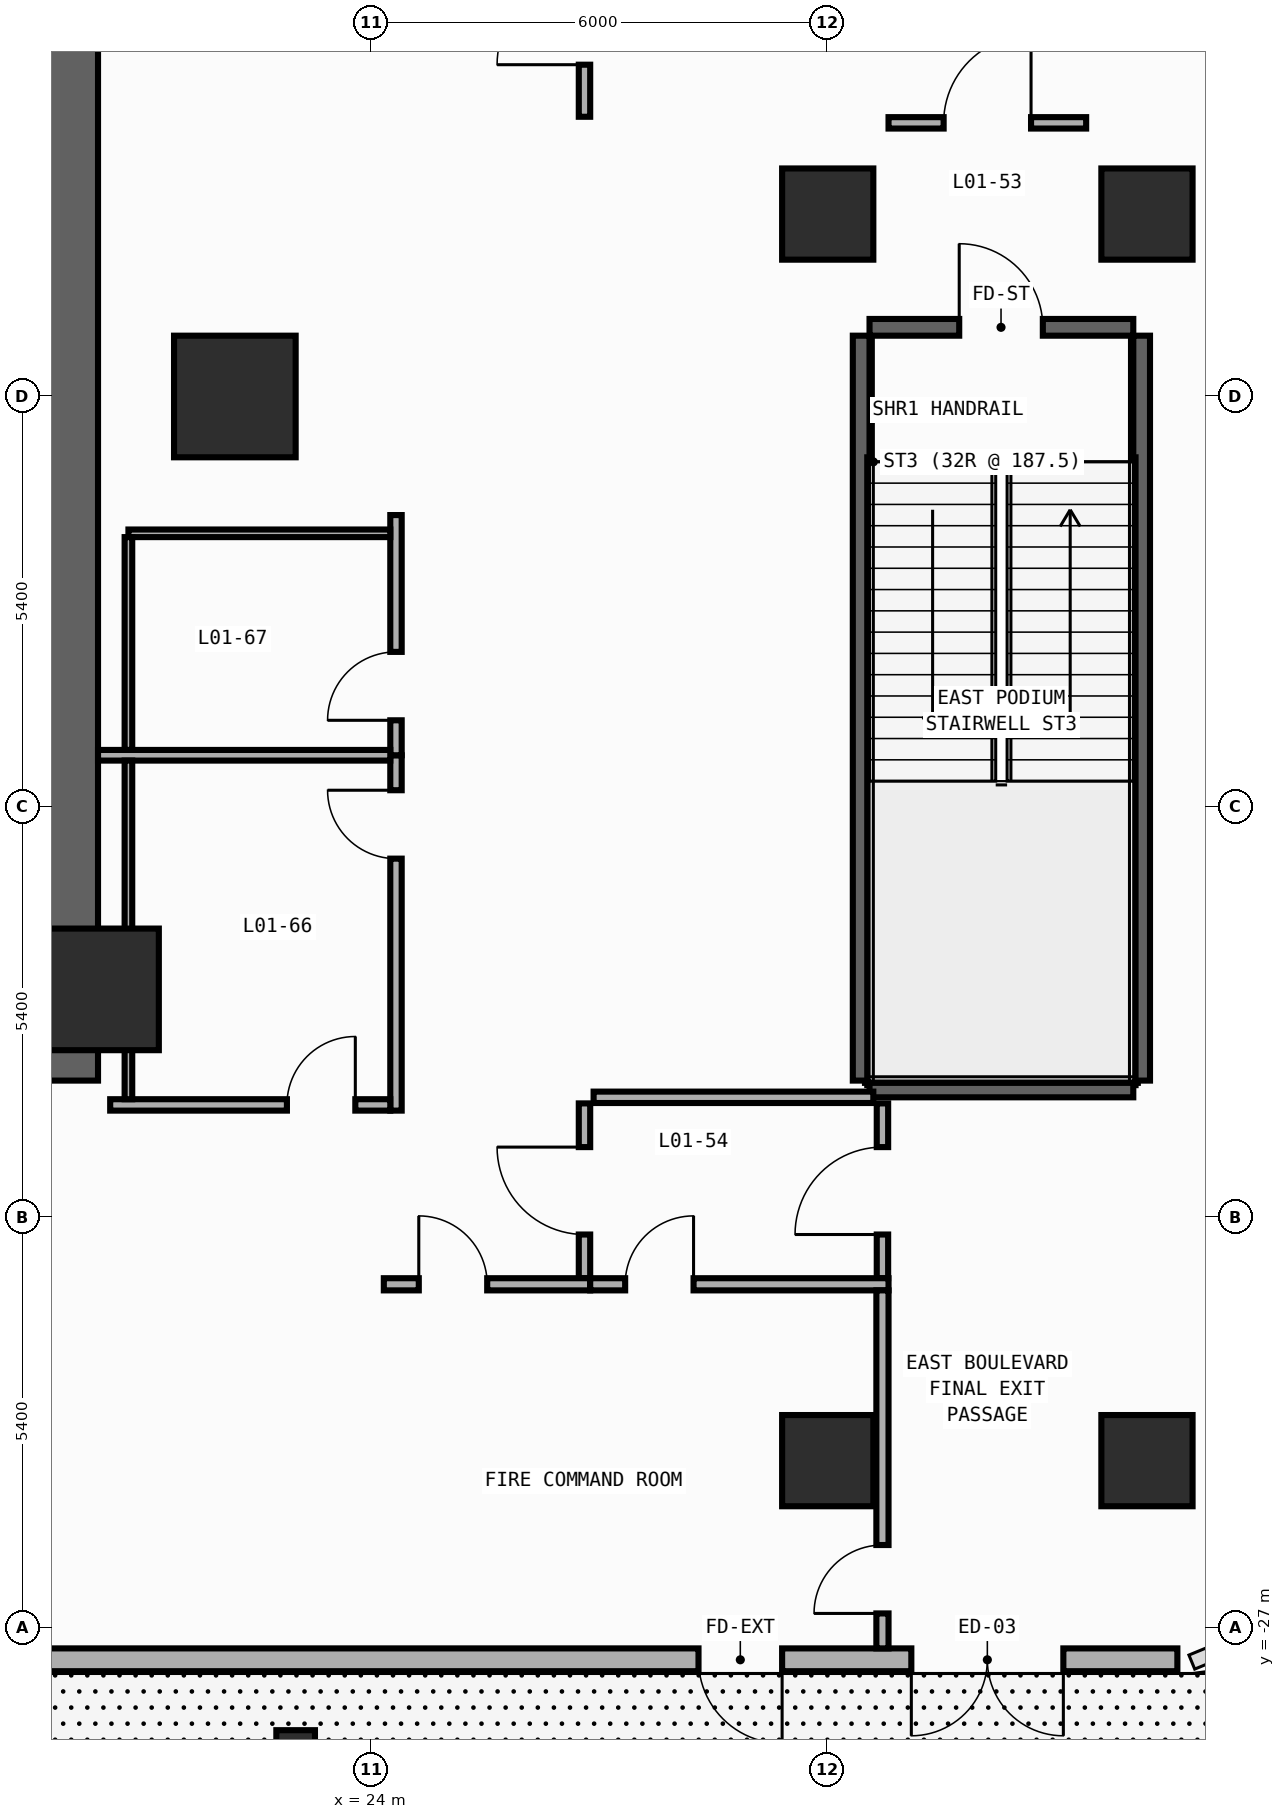
"""IFC4 building model, lengths in metres.
Left out: names, types, materials, properties, quantities, classifications, styles, units other than length and angle.
Written with IfcOpenShell. Run it as: python <this file> out.ifc"""

import sys

from ifc_helpers import new_model, si_unit, direction, frame, frame_2d, origin, origin_2d, place, context, subcontext, project, spatial, rectangle, hollow_circle, extrude, element, fill, save


model = new_model("IFC4")
c1 = context("Model", 3, precision=1e-05, world=origin(), true_north=direction((0.0, 1.0)))
c2 = subcontext(c1, "Body", "Model", "MODEL_VIEW")
j1 = project(units=[si_unit("LENGTHUNIT", "METRE"), si_unit("PLANEANGLEUNIT", "RADIAN")], contexts=[c1])
p1 = place(None, origin())
s1 = spatial("IfcSite", under=j1, at=p1, CompositionType="ELEMENT")
p2 = place(p1, origin())
s2 = spatial("IfcBuilding", under=s1, at=p2, CompositionType="ELEMENT")
p3 = place(p2, origin())
s3 = spatial("IfcBuildingStorey", under=s2, at=p3, CompositionType="ELEMENT", Elevation=0.0)
p4 = place(p3, frame((23.0, -28.6, -0.2), z_axis=(0.0, 0.0, 1.0), x_axis=(1.0, 0.0, 0.0)))
e1 = element("IfcColumn", 1, at=p4, inside=s3, PredefinedType="COLUMN", context=c2, shape_type="SweptSolid", body=[
    extrude(hollow_circle(Radius=0.254, WallThickness=0.025, at=origin_2d()), origin(), (0.0, 0.0, 1.0), 5.6),
])
p5 = place(p3, frame((20.0, -19.8, 0.0), z_axis=(0.0, 0.0, 1.0), x_axis=(0.0, 1.0, 0.0)))
e2 = element("IfcWall", 2, at=p5, inside=s3, PredefinedType="SHEAR", context=c2, shape_type="SweptSolid", body=[
    extrude(rectangle(XDim=27.0, YDim=0.8, at=frame_2d((13.5, 0.0))), origin(), (0.0, 0.0, 1.0), 5.7),
])
p6 = place(p3, frame((30.55, -9.89, 0.0), z_axis=(0.0, 0.0, 1.0), x_axis=(1.0, 0.0, 0.0)))
e3 = element("IfcWall", 3, at=p6, inside=s3, PredefinedType="SHEAR", context=c2, shape_type="SweptSolid", body=[
    extrude(rectangle(XDim=3.47, YDim=0.22, at=frame_2d((1.735, 0.0))), origin(), (0.0, 0.0, 1.0), 5.7),
])
p7 = place(p6, frame((1.18, 0.0, 0.0)))
e4 = element("IfcOpeningElement", 4, at=p7, cuts=e3, PredefinedType="OPENING", context=c2, shape_type="SweptSolid", body=[
    extrude(rectangle(XDim=1.1, YDim=2.2, at=frame_2d((0.55, 1.1))), frame((0.0, 0.12, 0.0), z_axis=(0.0, -1.0, 0.0), x_axis=(1.0, 0.0, 0.0)), (0.0, 0.0, 1.0), 0.24),
])
p8 = place(p3, frame((30.55, -19.91, 0.0), z_axis=(0.0, 0.0, 1.0), x_axis=(1.0, 0.0, 0.0)))
e5 = element("IfcWall", 5, at=p8, inside=s3, PredefinedType="SHEAR", context=c2, shape_type="SweptSolid", body=[
    extrude(rectangle(XDim=3.47, YDim=0.22, at=frame_2d((1.735, 0.0))), origin(), (0.0, 0.0, 1.0), 5.7),
])
for number, where, z_axis, x_axis in (
    (6, (30.44, -19.8, 0.0), (0.0, 0.0, 1.0), (0.0, 1.0, 0.0)),
    (7, (34.13, -19.8, 0.0), (0.0, 0.0, 1.0), (0.0, 1.0, 0.0)),
):
    element("IfcWall", number, at=place(p3, frame(where, z_axis=z_axis, x_axis=x_axis)), inside=s3, PredefinedType="SHEAR", context=c2, shape_type="SweptSolid", body=[
        extrude(rectangle(XDim=9.8, YDim=0.22, at=frame_2d((4.9, 0.0))), origin(), (0.0, 0.0, 1.0), 5.7),
    ])
p9 = place(p3, frame((20.4, -18.6, 0.0), z_axis=(0.0, 0.0, 1.0), x_axis=(1.0, 0.0, 0.0)))
e8 = element("IfcColumn", 8, at=p9, inside=s3, PredefinedType="COLUMN", context=c2, shape_type="SweptSolid", body=[
    extrude(rectangle(XDim=1.6, YDim=1.6, at=origin_2d()), origin(), (0.0, 0.0, 1.0), 6.0),
])
for number, where, z_axis, x_axis in (
    (9, (30.0, -24.8, 0.0), (0.0, 0.0, 1.0), (1.0, 0.0, 0.0)),
    (10, (30.0, -8.4, 0.0), (0.0, 0.0, 1.0), (1.0, 0.0, 0.0)),
    (11, (34.2, -24.8, 0.0), (0.0, 0.0, 1.0), (1.0, 0.0, 0.0)),
    (12, (34.2, -8.4, 0.0), (0.0, 0.0, 1.0), (1.0, 0.0, 0.0)),
):
    element("IfcColumn", number, at=place(p3, frame(where, z_axis=z_axis, x_axis=x_axis)), inside=s3, PredefinedType="COLUMN", context=c2, shape_type="SweptSolid", body=[
        extrude(rectangle(XDim=1.2, YDim=1.2, at=origin_2d()), origin(), (0.0, 0.0, 1.0), 6.0),
    ])
p10 = place(p3, frame((22.2, -10.8, 0.0), z_axis=(0.0, 0.0, 1.0), x_axis=(1.0, 0.0, 0.0)))
e13 = element("IfcColumn", 13, at=p10, inside=s3, PredefinedType="COLUMN", context=c2, shape_type="SweptSolid", body=[
    extrude(rectangle(XDim=1.6, YDim=1.6, at=origin_2d()), origin(), (0.0, 0.0, 1.0), 6.0),
])
p11 = place(p3, frame((34.6, -27.42, 0.0), z_axis=(0.0, 0.0, 1.0), x_axis=(-1.0, 0.0, 0.0)))
e14 = element("IfcWall", 14, at=p11, inside=s3, PredefinedType="STANDARD", context=c2, shape_type="SweptSolid", body=[
    extrude(rectangle(XDim=26.4, YDim=0.3, at=frame_2d((13.2, 0.0))), origin(), (0.0, 0.0, 1.0), 5.7),
])
p12 = place(p11, frame((1.5, 0.0, 0.0)))
e15 = element("IfcOpeningElement", 15, at=p12, cuts=e14, PredefinedType="OPENING", context=c2, shape_type="SweptSolid", body=[
    extrude(rectangle(XDim=2.0, YDim=2.4, at=frame_2d((1.0, 1.2))), frame((0.0, 0.16, 0.0), z_axis=(0.0, -1.0, 0.0), x_axis=(1.0, 0.0, 0.0)), (0.0, 0.0, 1.0), 0.32),
])
p13 = place(p11, frame((5.2, 0.0, 0.0)))
e16 = element("IfcOpeningElement", 16, at=p13, cuts=e14, PredefinedType="OPENING", context=c2, shape_type="SweptSolid", body=[
    extrude(rectangle(XDim=1.1, YDim=2.2, at=frame_2d((0.55, 1.1))), frame((0.0, 0.16, 0.0), z_axis=(0.0, -1.0, 0.0), x_axis=(1.0, 0.0, 0.0)), (0.0, 0.0, 1.0), 0.32),
])
p14 = place(p3, frame((30.8, -7.2, 0.0), z_axis=(0.0, 0.0, 1.0), x_axis=(1.0, 0.0, 0.0)))
e17 = element("IfcWall", 17, at=p14, inside=s3, PredefinedType="PARTITIONING", context=c2, shape_type="SweptSolid", body=[
    extrude(rectangle(XDim=2.6, YDim=0.15, at=frame_2d((1.3, 0.0))), origin(), (0.0, 0.0, 1.0), 5.7),
])
p15 = place(p14, frame((0.725, 0.0, 0.0)))
e18 = element("IfcOpeningElement", 18, at=p15, cuts=e17, PredefinedType="OPENING", context=c2, shape_type="SweptSolid", body=[
    extrude(rectangle(XDim=1.15, YDim=2.2, at=frame_2d((0.575, 1.1))), frame((0.0, 0.085, 0.0), z_axis=(0.0, -1.0, 0.0), x_axis=(1.0, 0.0, 0.0)), (0.0, 0.0, 1.0), 0.17),
])
p16 = place(p3, frame((26.8, -7.12, 0.0), z_axis=(0.0, 0.0, 1.0), x_axis=(0.0, 1.0, 0.0)))
e19 = element("IfcWall", 19, at=p16, inside=s3, PredefinedType="PARTITIONING", context=c2, shape_type="SweptSolid", body=[
    extrude(rectangle(XDim=2.52, YDim=0.15, at=frame_2d((1.26, 0.0))), origin(), (0.0, 0.0, 1.0), 5.7),
])
p17 = place(p16, frame((0.685, 0.0, 0.0)))
e20 = element("IfcOpeningElement", 20, at=p17, cuts=e19, PredefinedType="OPENING", context=c2, shape_type="SweptSolid", body=[
    extrude(rectangle(XDim=1.15, YDim=2.2, at=frame_2d((0.575, 1.1))), frame((0.0, 0.085, 0.0), z_axis=(0.0, -1.0, 0.0), x_axis=(1.0, 0.0, 0.0)), (0.0, 0.0, 1.0), 0.17),
])
p18 = place(p3, frame((26.8, -22.4, 0.0), z_axis=(0.0, 0.0, 1.0), x_axis=(0.0, 1.0, 0.0)))
e21 = element("IfcWall", 21, at=p18, inside=s3, PredefinedType="PARTITIONING", context=c2, shape_type="SweptSolid", body=[
    extrude(rectangle(XDim=2.3, YDim=0.15, at=frame_2d((1.15, 0.0))), origin(), (0.0, 0.0, 1.0), 5.7),
])
p19 = place(p18, frame((0.575, 0.0, 0.0)))
e22 = element("IfcOpeningElement", 22, at=p19, cuts=e21, PredefinedType="OPENING", context=c2, shape_type="SweptSolid", body=[
    extrude(rectangle(XDim=1.15, YDim=2.2, at=frame_2d((0.575, 1.1))), frame((0.0, 0.085, 0.0), z_axis=(0.0, -1.0, 0.0), x_axis=(1.0, 0.0, 0.0)), (0.0, 0.0, 1.0), 0.17),
])
p20 = place(p3, frame((30.72, -22.4, 0.0), z_axis=(0.0, 0.0, 1.0), x_axis=(0.0, 1.0, 0.0)))
e23 = element("IfcWall", 23, at=p20, inside=s3, PredefinedType="PARTITIONING", context=c2, shape_type="SweptSolid", body=[
    extrude(rectangle(XDim=2.3, YDim=0.15, at=frame_2d((1.15, 0.0))), origin(), (0.0, 0.0, 1.0), 5.7),
])
p21 = place(p20, frame((0.575, 0.0, 0.0)))
e24 = element("IfcOpeningElement", 24, at=p21, cuts=e23, PredefinedType="OPENING", context=c2, shape_type="SweptSolid", body=[
    extrude(rectangle(XDim=1.15, YDim=2.2, at=frame_2d((0.575, 1.1))), frame((0.0, 0.085, 0.0), z_axis=(0.0, -1.0, 0.0), x_axis=(1.0, 0.0, 0.0)), (0.0, 0.0, 1.0), 0.17),
])
p22 = place(p3, frame((26.92, -20.02, 0.0), z_axis=(0.0, 0.0, 1.0), x_axis=(1.0, 0.0, 0.0)))
e25 = element("IfcWall", 25, at=p22, inside=s3, PredefinedType="PARTITIONING", context=c2, shape_type="SweptSolid", body=[
    extrude(rectangle(XDim=3.68, YDim=0.15, at=frame_2d((1.84, 0.0))), origin(), (0.0, 0.0, 1.0), 5.7),
])
p23 = place(p3, frame((24.16, -22.48, 0.0), z_axis=(0.0, 0.0, 1.0), x_axis=(1.0, 0.0, 0.0)))
e26 = element("IfcWall", 26, at=p23, inside=s3, PredefinedType="PARTITIONING", context=c2, shape_type="SweptSolid", body=[
    extrude(rectangle(XDim=2.715, YDim=0.16, at=frame_2d((1.357, 0.0))), origin(), (0.0, 0.0, 1.0), 5.7),
])
p24 = place(p23, frame((0.46, 0.0, 0.0)))
e27 = element("IfcOpeningElement", 27, at=p24, cuts=e26, PredefinedType="OPENING", context=c2, shape_type="SweptSolid", body=[
    extrude(rectangle(XDim=0.9, YDim=2.15, at=frame_2d((0.45, 1.075))), frame((0.0, 0.09, 0.0), z_axis=(0.0, -1.0, 0.0), x_axis=(1.0, 0.0, 0.0)), (0.0, 0.0, 1.0), 0.18),
])
p25 = place(p3, frame((24.32, -20.195, 0.0), z_axis=(0.0, 0.0, 1.0), x_axis=(0.0, 1.0, 0.0)))
e28 = element("IfcWall", 28, at=p25, inside=s3, PredefinedType="PARTITIONING", context=c2, shape_type="SweptSolid", body=[
    extrude(rectangle(XDim=4.675, YDim=0.15, at=frame_2d((2.337, 0.0))), origin(), (0.0, 0.0, 1.0), 5.7),
])
p26 = place(p25, frame((3.315, 0.0, 0.0)))
e29 = element("IfcOpeningElement", 29, at=p26, cuts=e28, PredefinedType="OPENING", context=c2, shape_type="SweptSolid", body=[
    extrude(rectangle(XDim=0.9, YDim=2.15, at=frame_2d((0.45, 1.075))), frame((0.0, 0.085, 0.0), z_axis=(0.0, -1.0, 0.0), x_axis=(1.0, 0.0, 0.0)), (0.0, 0.0, 1.0), 0.17),
])
p27 = place(p3, frame((24.32, -15.52, 0.0), z_axis=(0.0, 0.0, 1.0), x_axis=(0.0, 1.0, 0.0)))
e30 = element("IfcWall", 30, at=p27, inside=s3, PredefinedType="PARTITIONING", context=c2, shape_type="SweptSolid", body=[
    extrude(rectangle(XDim=3.16, YDim=0.15, at=frame_2d((1.58, 0.0))), origin(), (0.0, 0.0, 1.0), 5.7),
])
p28 = place(p27, frame((0.46, 0.0, 0.0)))
e31 = element("IfcOpeningElement", 31, at=p28, cuts=e30, PredefinedType="OPENING", context=c2, shape_type="SweptSolid", body=[
    extrude(rectangle(XDim=0.9, YDim=2.15, at=frame_2d((0.45, 1.075))), frame((0.0, 0.085, 0.0), z_axis=(0.0, -1.0, 0.0), x_axis=(1.0, 0.0, 0.0)), (0.0, 0.0, 1.0), 0.17),
])
p29 = place(p3, frame((26.875, -22.48, 0.0), z_axis=(0.0, 0.0, 1.0), x_axis=(1.0, 0.0, 0.0)))
e32 = element("IfcWall", 32, at=p29, inside=s3, PredefinedType="PARTITIONING", context=c2, shape_type="SweptSolid", body=[
    extrude(rectangle(XDim=3.925, YDim=0.16, at=frame_2d((1.962, 0.0))), origin(), (0.0, 0.0, 1.0), 5.7),
])
p30 = place(p29, frame((0.46, 0.0, 0.0)))
e33 = element("IfcOpeningElement", 33, at=p30, cuts=e32, PredefinedType="OPENING", context=c2, shape_type="SweptSolid", body=[
    extrude(rectangle(XDim=0.9, YDim=2.15, at=frame_2d((0.45, 1.075))), frame((0.0, 0.09, 0.0), z_axis=(0.0, -1.0, 0.0), x_axis=(1.0, 0.0, 0.0)), (0.0, 0.0, 1.0), 0.18),
])
p31 = place(p3, frame((30.72, -27.27, 0.0), z_axis=(0.0, 0.0, 1.0), x_axis=(0.0, 1.0, 0.0)))
e34 = element("IfcWall", 34, at=p31, inside=s3, PredefinedType="PARTITIONING", context=c2, shape_type="SweptSolid", body=[
    extrude(rectangle(XDim=4.71, YDim=0.16, at=frame_2d((2.355, 0.0))), origin(), (0.0, 0.0, 1.0), 5.7),
])
p32 = place(p31, frame((0.46, 0.0, 0.0)))
e35 = element("IfcOpeningElement", 35, at=p32, cuts=e34, PredefinedType="OPENING", context=c2, shape_type="SweptSolid", body=[
    extrude(rectangle(XDim=0.9, YDim=2.15, at=frame_2d((0.45, 1.075))), frame((0.0, 0.09, 0.0), z_axis=(0.0, -1.0, 0.0), x_axis=(1.0, 0.0, 0.0)), (0.0, 0.0, 1.0), 0.18),
])
p33 = place(p3, frame((20.56, -20.12, 0.0), z_axis=(0.0, 0.0, 1.0), x_axis=(1.0, 0.0, 0.0)))
e36 = element("IfcWall", 36, at=p33, inside=s3, PredefinedType="PARTITIONING", context=c2, shape_type="SweptSolid", body=[
    extrude(rectangle(XDim=3.685, YDim=0.15, at=frame_2d((1.843, 0.0))), origin(), (0.0, 0.0, 1.0), 5.7),
])
p34 = place(p33, frame((2.325, 0.0, 0.0)))
e37 = element("IfcOpeningElement", 37, at=p34, cuts=e36, PredefinedType="OPENING", context=c2, shape_type="SweptSolid", body=[
    extrude(rectangle(XDim=0.9, YDim=2.15, at=frame_2d((0.45, 1.075))), frame((0.0, 0.085, 0.0), z_axis=(0.0, -1.0, 0.0), x_axis=(1.0, 0.0, 0.0)), (0.0, 0.0, 1.0), 0.17),
])
p35 = place(p3, frame((20.4, -15.52, 0.0), z_axis=(0.0, 0.0, 1.0), x_axis=(1.0, 0.0, 0.0)))
e38 = element("IfcWall", 38, at=p35, inside=s3, PredefinedType="PARTITIONING", context=c2, shape_type="SweptSolid", body=[
    extrude(rectangle(XDim=3.845, YDim=0.14, at=frame_2d((1.923, 0.0))), origin(), (0.0, 0.0, 1.0), 5.7),
])
p36 = place(p3, frame((20.8, -20.045, 0.0), z_axis=(0.0, 0.0, 1.0), x_axis=(0.0, 1.0, 0.0)))
e39 = element("IfcWall", 39, at=p36, inside=s3, PredefinedType="PARTITIONING", context=c2, shape_type="SweptSolid", body=[
    extrude(rectangle(XDim=4.455, YDim=0.1, at=frame_2d((2.228, 0.0))), origin(), (0.0, 0.0, 1.0), 5.7),
])
p37 = place(p3, frame((20.8, -12.6, 0.0), z_axis=(0.0, 0.0, 1.0), x_axis=(1.0, 0.0, 0.0)))
e40 = element("IfcWall", 40, at=p37, inside=s3, PredefinedType="PARTITIONING", context=c2, shape_type="SweptSolid", body=[
    extrude(rectangle(XDim=3.445, YDim=0.1, at=frame_2d((1.723, 0.0))), origin(), (0.0, 0.0, 1.0), 5.7),
])
p38 = place(p3, frame((20.8, -15.45, 0.0), z_axis=(0.0, 0.0, 1.0), x_axis=(0.0, 1.0, 0.0)))
e41 = element("IfcWall", 41, at=p38, inside=s3, PredefinedType="PARTITIONING", context=c2, shape_type="SweptSolid", body=[
    extrude(rectangle(XDim=2.8, YDim=0.1, at=frame_2d((1.4, 0.0))), origin(), (0.0, 0.0, 1.0), 5.7),
])
p39 = place(p12, origin())
e42 = element("IfcDoor", 42, at=p39, inside=s3, OperationType="DOUBLE_DOOR_SINGLE_SWING", PredefinedType="DOOR", context=c2, shape_type="SweptSolid", body=[
    extrude(rectangle(XDim=2.0, YDim=2.4, at=frame_2d((1.0, 1.2))), frame((0.0, 0.025, 0.0), z_axis=(0.0, -1.0, 0.0), x_axis=(1.0, 0.0, 0.0)), (0.0, 0.0, 1.0), 0.05),
])
fill(e15, e42)
p40 = place(p13, origin())
e43 = element("IfcDoor", 43, at=p40, inside=s3, OperationType="SINGLE_SWING_LEFT", PredefinedType="DOOR", context=c2, shape_type="SweptSolid", body=[
    extrude(rectangle(XDim=1.1, YDim=2.2, at=frame_2d((0.55, 1.1))), frame((0.0, 0.025, 0.0), z_axis=(0.0, -1.0, 0.0), x_axis=(1.0, 0.0, 0.0)), (0.0, 0.0, 1.0), 0.05),
])
fill(e16, e43)
p41 = place(p7, origin())
e44 = element("IfcDoor", 44, at=p41, inside=s3, OperationType="SINGLE_SWING_LEFT", PredefinedType="DOOR", context=c2, shape_type="SweptSolid", body=[
    extrude(rectangle(XDim=1.1, YDim=2.2, at=frame_2d((0.55, 1.1))), frame((0.0, 0.025, 0.0), z_axis=(0.0, -1.0, 0.0), x_axis=(1.0, 0.0, 0.0)), (0.0, 0.0, 1.0), 0.05),
])
fill(e4, e44)
p42 = place(p15, origin())
e45 = element("IfcDoor", 45, at=p42, inside=s3, OperationType="SINGLE_SWING_RIGHT", PredefinedType="DOOR", context=c2, shape_type="SweptSolid", body=[
    extrude(rectangle(XDim=1.15, YDim=2.2, at=frame_2d((0.575, 1.1))), frame((0.0, 0.025, 0.0), z_axis=(0.0, -1.0, 0.0), x_axis=(1.0, 0.0, 0.0)), (0.0, 0.0, 1.0), 0.05),
])
fill(e18, e45)
p43 = place(p17, origin())
e46 = element("IfcDoor", 46, at=p43, inside=s3, OperationType="SINGLE_SWING_LEFT", PredefinedType="DOOR", context=c2, shape_type="SweptSolid", body=[
    extrude(rectangle(XDim=1.15, YDim=2.2, at=frame_2d((0.575, 1.1))), frame((0.0, 0.025, 0.0), z_axis=(0.0, -1.0, 0.0), x_axis=(1.0, 0.0, 0.0)), (0.0, 0.0, 1.0), 0.05),
])
fill(e20, e46)
p44 = place(p19, origin())
e47 = element("IfcDoor", 47, at=p44, inside=s3, OperationType="SINGLE_SWING_RIGHT", PredefinedType="DOOR", context=c2, shape_type="SweptSolid", body=[
    extrude(rectangle(XDim=1.15, YDim=2.2, at=frame_2d((0.575, 1.1))), frame((0.0, 0.025, 0.0), z_axis=(0.0, -1.0, 0.0), x_axis=(1.0, 0.0, 0.0)), (0.0, 0.0, 1.0), 0.05),
])
fill(e22, e47)
p45 = place(p21, origin())
e48 = element("IfcDoor", 48, at=p45, inside=s3, OperationType="SINGLE_SWING_LEFT", PredefinedType="DOOR", context=c2, shape_type="SweptSolid", body=[
    extrude(rectangle(XDim=1.15, YDim=2.2, at=frame_2d((0.575, 1.1))), frame((0.0, 0.025, 0.0), z_axis=(0.0, -1.0, 0.0), x_axis=(1.0, 0.0, 0.0)), (0.0, 0.0, 1.0), 0.05),
])
fill(e24, e48)
p46 = place(p24, origin())
e49 = element("IfcDoor", 49, at=p46, inside=s3, OperationType="SINGLE_SWING_LEFT", PredefinedType="DOOR", context=c2, shape_type="SweptSolid", body=[
    extrude(rectangle(XDim=0.9, YDim=2.15, at=frame_2d((0.45, 1.075))), frame((0.0, 0.025, 0.0), z_axis=(0.0, -1.0, 0.0), x_axis=(1.0, 0.0, 0.0)), (0.0, 0.0, 1.0), 0.05),
])
fill(e27, e49)
p47 = place(p26, origin())
e50 = element("IfcDoor", 50, at=p47, inside=s3, OperationType="SINGLE_SWING_RIGHT", PredefinedType="DOOR", context=c2, shape_type="SweptSolid", body=[
    extrude(rectangle(XDim=0.9, YDim=2.15, at=frame_2d((0.45, 1.075))), frame((0.0, 0.025, 0.0), z_axis=(0.0, -1.0, 0.0), x_axis=(1.0, 0.0, 0.0)), (0.0, 0.0, 1.0), 0.05),
])
fill(e29, e50)
p48 = place(p28, origin())
e51 = element("IfcDoor", 51, at=p48, inside=s3, OperationType="SINGLE_SWING_LEFT", PredefinedType="DOOR", context=c2, shape_type="SweptSolid", body=[
    extrude(rectangle(XDim=0.9, YDim=2.15, at=frame_2d((0.45, 1.075))), frame((0.0, 0.025, 0.0), z_axis=(0.0, -1.0, 0.0), x_axis=(1.0, 0.0, 0.0)), (0.0, 0.0, 1.0), 0.05),
])
fill(e31, e51)
p49 = place(p30, origin())
e52 = element("IfcDoor", 52, at=p49, inside=s3, OperationType="SINGLE_SWING_RIGHT", PredefinedType="DOOR", context=c2, shape_type="SweptSolid", body=[
    extrude(rectangle(XDim=0.9, YDim=2.15, at=frame_2d((0.45, 1.075))), frame((0.0, 0.025, 0.0), z_axis=(0.0, -1.0, 0.0), x_axis=(1.0, 0.0, 0.0)), (0.0, 0.0, 1.0), 0.05),
])
fill(e33, e52)
p50 = place(p32, origin())
e53 = element("IfcDoor", 53, at=p50, inside=s3, OperationType="SINGLE_SWING_LEFT", PredefinedType="DOOR", context=c2, shape_type="SweptSolid", body=[
    extrude(rectangle(XDim=0.9, YDim=2.15, at=frame_2d((0.45, 1.075))), frame((0.0, 0.025, 0.0), z_axis=(0.0, -1.0, 0.0), x_axis=(1.0, 0.0, 0.0)), (0.0, 0.0, 1.0), 0.05),
])
fill(e35, e53)
p51 = place(p34, origin())
e54 = element("IfcDoor", 54, at=p51, inside=s3, OperationType="SINGLE_SWING_RIGHT", PredefinedType="DOOR", context=c2, shape_type="SweptSolid", body=[
    extrude(rectangle(XDim=0.9, YDim=2.15, at=frame_2d((0.45, 1.075))), frame((0.0, 0.025, 0.0), z_axis=(0.0, -1.0, 0.0), x_axis=(1.0, 0.0, 0.0)), (0.0, 0.0, 1.0), 0.05),
])
fill(e37, e54)
save(model, sys.argv[1])
